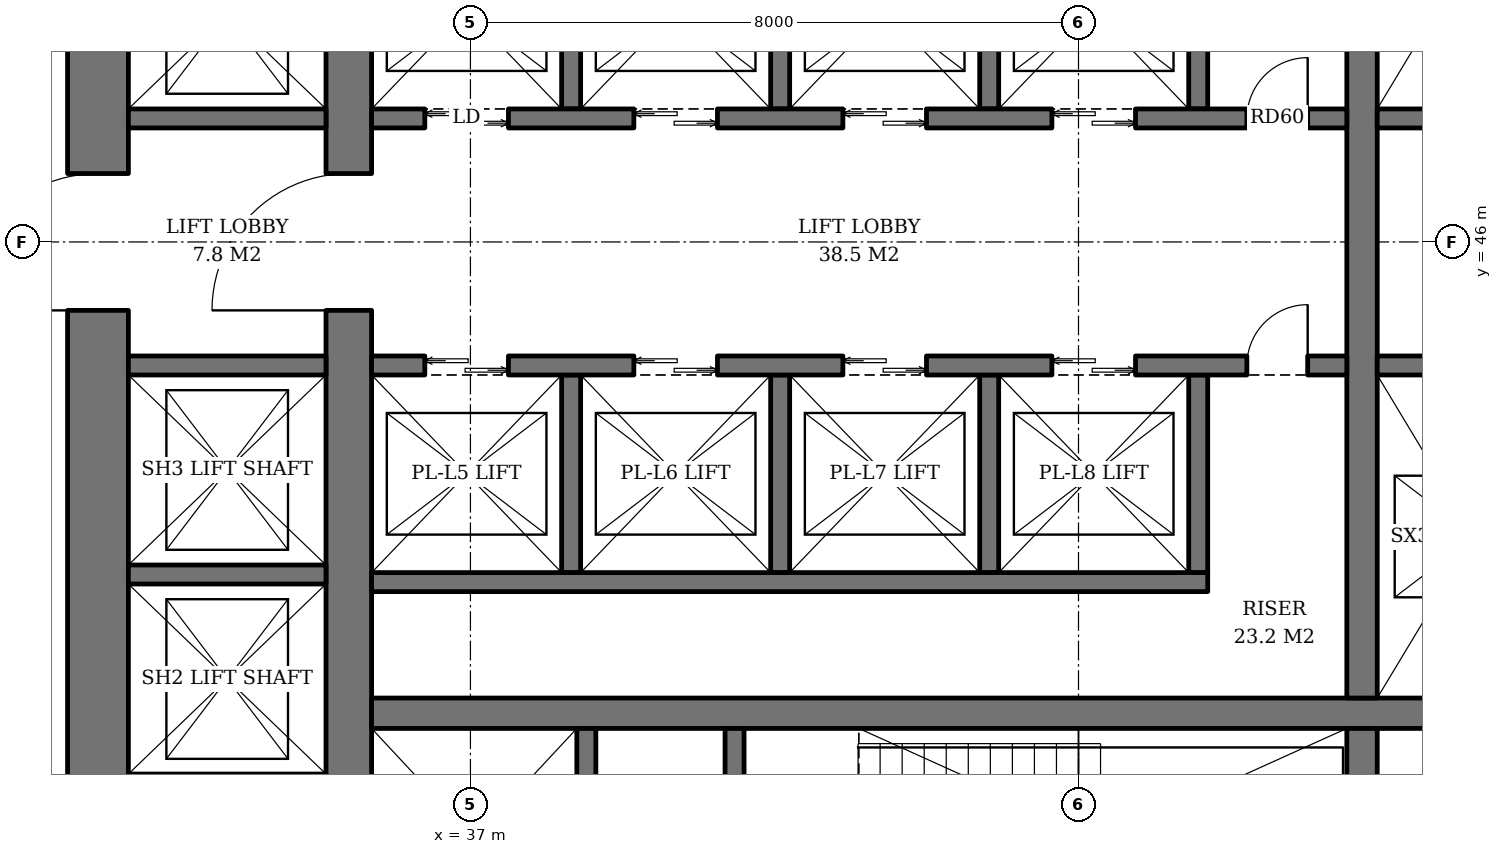
"""IFC4 building model, lengths in metres.
Left out: names, types, materials, properties, quantities, classifications, styles, units other than length and angle.
Written with IfcOpenShell. Run it as: python <this file> out.ifc"""

import sys

from ifc_helpers import new_model, si_unit, direction, frame, frame_2d, origin, place, context, subcontext, project, spatial, rectangle, extrude, element, fill, save


model = new_model("IFC4")
c1 = context("Model", 3, precision=1e-05, world=origin(), true_north=direction((0.0, 1.0)))
c2 = subcontext(c1, "Body", "Model", "MODEL_VIEW")
j1 = project(units=[si_unit("LENGTHUNIT", "METRE"), si_unit("PLANEANGLEUNIT", "RADIAN")], contexts=[c1])
p1 = place(None, origin())
s1 = spatial("IfcSite", under=j1, at=p1, CompositionType="ELEMENT")
p2 = place(p1, origin())
s2 = spatial("IfcBuilding", under=s1, at=p2, CompositionType="ELEMENT")
p3 = place(p2, frame((0.0, 0.0, 62.8)))
s3 = spatial("IfcBuildingStorey", under=s2, at=p3, CompositionType="ELEMENT", Elevation=62.8)
p4 = place(p3, frame((35.4, 36.7, 0.0), z_axis=(0.0, 0.0, 1.0), x_axis=(0.0, 1.0, 0.0)))
e1 = element("IfcWall", 1, at=p4, inside=s3, PredefinedType="SHEAR", context=c2, shape_type="SweptSolid", body=[
    extrude(rectangle(XDim=18.6, YDim=0.6, at=frame_2d((9.3, 0.0))), origin(), (0.0, 0.0, 1.0), 3.8),
])
p5 = place(p4, frame((8.4, 0.0, 0.0)))
e2 = element("IfcOpeningElement", 2, at=p5, cuts=e1, PredefinedType="OPENING", context=c2, shape_type="SweptSolid", body=[
    extrude(rectangle(XDim=1.8, YDim=2.4, at=frame_2d((0.9, 1.2))), frame((0.0, 0.31, 0.0), z_axis=(0.0, -1.0, 0.0), x_axis=(1.0, 0.0, 0.0)), (0.0, 0.0, 1.0), 0.62),
])
p6 = place(p3, frame((32.1, 33.5, 0.0), z_axis=(0.0, 0.0, 1.0), x_axis=(0.0, 1.0, 0.0)))
e3 = element("IfcWall", 3, at=p6, inside=s3, PredefinedType="SHEAR", context=c2, shape_type="SweptSolid", body=[
    extrude(rectangle(XDim=25.0, YDim=0.8, at=frame_2d((12.5, 0.0))), origin(), (0.0, 0.0, 1.0), 3.8),
])
p7 = place(p6, frame((11.6, 0.0, 0.0)))
e4 = element("IfcOpeningElement", 4, at=p7, cuts=e3, PredefinedType="OPENING", context=c2, shape_type="SweptSolid", body=[
    extrude(rectangle(XDim=1.8, YDim=2.4, at=frame_2d((0.9, 1.2))), frame((0.0, 0.41, 0.0), z_axis=(0.0, -1.0, 0.0), x_axis=(1.0, 0.0, 0.0)), (0.0, 0.0, 1.0), 0.82),
])
p8 = place(p3, frame((35.7, 39.8, 0.0), z_axis=(0.0, 0.0, 1.0), x_axis=(1.0, 0.0, 0.0)))
e5 = element("IfcWall", 5, at=p8, inside=s3, PredefinedType="SHEAR", context=c2, shape_type="SweptSolid", body=[
    extrude(rectangle(XDim=18.6, YDim=0.4, at=frame_2d((9.3, 0.0))), origin(), (0.0, 0.0, 1.0), 3.8),
])
p9 = place(p3, frame((48.73, 36.7, 0.0), z_axis=(0.0, 0.0, 1.0), x_axis=(0.0, 1.0, 0.0)))
e6 = element("IfcWall", 6, at=p9, inside=s3, PredefinedType="SHEAR", context=c2, shape_type="SweptSolid", body=[
    extrude(rectangle(XDim=2.9, YDim=0.4, at=frame_2d((1.45, 0.0))), origin(), (0.0, 0.0, 1.0), 3.8),
])
p10 = place(p3, frame((48.73, 40.0, 0.0), z_axis=(0.0, 0.0, 1.0), x_axis=(0.0, 1.0, 0.0)))
e7 = element("IfcWall", 7, at=p10, inside=s3, PredefinedType="SHEAR", context=c2, shape_type="SweptSolid", body=[
    extrude(rectangle(XDim=12.0, YDim=0.4, at=frame_2d((6.0, 0.0))), origin(), (0.0, 0.0, 1.0), 3.8),
])
p11 = place(p3, frame((38.525, 36.7, 0.0), z_axis=(0.0, 0.0, 1.0), x_axis=(0.0, 1.0, 0.0)))
e8 = element("IfcWall", 8, at=p11, inside=s3, PredefinedType="SHEAR", context=c2, shape_type="SweptSolid", body=[
    extrude(rectangle(XDim=2.9, YDim=0.25, at=frame_2d((1.45, 0.0))), origin(), (0.0, 0.0, 1.0), 3.8),
])
p12 = place(p11, frame((0.8, 0.0, 0.0)))
e9 = element("IfcOpeningElement", 9, at=p12, cuts=e8, PredefinedType="OPENING", context=c2, shape_type="SweptSolid", body=[
    extrude(rectangle(XDim=1.3, YDim=2.2, at=frame_2d((0.65, 1.1))), frame((0.0, 0.135, 0.0), z_axis=(0.0, -1.0, 0.0), x_axis=(1.0, 0.0, 0.0)), (0.0, 0.0, 1.0), 0.27),
])
p13 = place(p3, frame((40.475, 36.7, 0.0), z_axis=(0.0, 0.0, 1.0), x_axis=(0.0, 1.0, 0.0)))
e10 = element("IfcWall", 10, at=p13, inside=s3, PredefinedType="SHEAR", context=c2, shape_type="SweptSolid", body=[
    extrude(rectangle(XDim=2.9, YDim=0.25, at=frame_2d((1.45, 0.0))), origin(), (0.0, 0.0, 1.0), 3.8),
])
p14 = place(p13, frame((0.75, 0.0, 0.0)))
e11 = element("IfcOpeningElement", 11, at=p14, cuts=e10, PredefinedType="OPENING", context=c2, shape_type="SweptSolid", body=[
    extrude(rectangle(XDim=1.2, YDim=2.1, at=frame_2d((0.6, 1.05))), frame((0.0, 0.135, 0.0), z_axis=(0.0, -1.0, 0.0), x_axis=(1.0, 0.0, 0.0)), (0.0, 0.0, 1.0), 0.27),
])
for number, where, z_axis, x_axis in (
    (12, (38.325, 47.75, 0.0), (0.0, 0.0, 1.0), (0.0, 1.0, 0.0)),
    (13, (41.075, 47.75, 0.0), (0.0, 0.0, 1.0), (0.0, 1.0, 0.0)),
    (14, (43.825, 47.75, 0.0), (0.0, 0.0, 1.0), (0.0, 1.0, 0.0)),
    (15, (46.575, 47.75, 0.0), (0.0, 0.0, 1.0), (0.0, 1.0, 0.0)),
):
    element("IfcWall", number, at=place(p3, frame(where, z_axis=z_axis, x_axis=x_axis)), inside=s3, PredefinedType="SHEAR", context=c2, shape_type="SweptSolid", body=[
        extrude(rectangle(XDim=2.6, YDim=0.25, at=frame_2d((1.3, 0.0))), origin(), (0.0, 0.0, 1.0), 3.8),
    ])
p15 = place(p3, frame((35.7, 47.625, 0.0), z_axis=(0.0, 0.0, 1.0), x_axis=(1.0, 0.0, 0.0)))
e16 = element("IfcWall", 16, at=p15, inside=s3, PredefinedType="SHEAR", context=c2, shape_type="SweptSolid", body=[
    extrude(rectangle(XDim=12.83, YDim=0.25, at=frame_2d((6.415, 0.0))), origin(), (0.0, 0.0, 1.0), 3.8),
])
p16 = place(p15, frame((0.7, 0.0, 0.0)))
e17 = element("IfcOpeningElement", 17, at=p16, cuts=e16, PredefinedType="OPENING", context=c2, shape_type="SweptSolid", body=[
    extrude(rectangle(XDim=1.1, YDim=2.2, at=frame_2d((0.55, 1.1))), frame((0.0, 0.135, 0.0), z_axis=(0.0, -1.0, 0.0), x_axis=(1.0, 0.0, 0.0)), (0.0, 0.0, 1.0), 0.27),
])
p17 = place(p15, frame((3.45, 0.0, 0.0)))
e18 = element("IfcOpeningElement", 18, at=p17, cuts=e16, PredefinedType="OPENING", context=c2, shape_type="SweptSolid", body=[
    extrude(rectangle(XDim=1.1, YDim=2.2, at=frame_2d((0.55, 1.1))), frame((0.0, 0.135, 0.0), z_axis=(0.0, -1.0, 0.0), x_axis=(1.0, 0.0, 0.0)), (0.0, 0.0, 1.0), 0.27),
])
p18 = place(p15, frame((6.2, 0.0, 0.0)))
e19 = element("IfcOpeningElement", 19, at=p18, cuts=e16, PredefinedType="OPENING", context=c2, shape_type="SweptSolid", body=[
    extrude(rectangle(XDim=1.1, YDim=2.2, at=frame_2d((0.55, 1.1))), frame((0.0, 0.135, 0.0), z_axis=(0.0, -1.0, 0.0), x_axis=(1.0, 0.0, 0.0)), (0.0, 0.0, 1.0), 0.27),
])
p19 = place(p15, frame((8.95, 0.0, 0.0)))
e20 = element("IfcOpeningElement", 20, at=p19, cuts=e16, PredefinedType="OPENING", context=c2, shape_type="SweptSolid", body=[
    extrude(rectangle(XDim=1.1, YDim=2.2, at=frame_2d((0.55, 1.1))), frame((0.0, 0.135, 0.0), z_axis=(0.0, -1.0, 0.0), x_axis=(1.0, 0.0, 0.0)), (0.0, 0.0, 1.0), 0.27),
])
p20 = place(p15, frame((11.515, 0.0, 0.0)))
e21 = element("IfcOpeningElement", 21, at=p20, cuts=e16, PredefinedType="OPENING", context=c2, shape_type="SweptSolid", body=[
    extrude(rectangle(XDim=0.8, YDim=2.0, at=frame_2d((0.4, 1.0))), frame((0.0, 0.135, 0.0), z_axis=(0.0, -1.0, 0.0), x_axis=(1.0, 0.0, 0.0)), (0.0, 0.0, 1.0), 0.27),
])
for number, where, z_axis, x_axis in (
    (22, (38.325, 44.25, 0.0), (0.0, 0.0, 1.0), (0.0, -1.0, 0.0)),
    (23, (41.075, 44.25, 0.0), (0.0, 0.0, 1.0), (0.0, -1.0, 0.0)),
    (24, (43.825, 44.25, 0.0), (0.0, 0.0, 1.0), (0.0, -1.0, 0.0)),
    (25, (46.575, 44.25, 0.0), (0.0, 0.0, 1.0), (0.0, -1.0, 0.0)),
):
    element("IfcWall", number, at=place(p3, frame(where, z_axis=z_axis, x_axis=x_axis)), inside=s3, PredefinedType="SHEAR", context=c2, shape_type="SweptSolid", body=[
        extrude(rectangle(XDim=2.6, YDim=0.25, at=frame_2d((1.3, 0.0))), origin(), (0.0, 0.0, 1.0), 3.8),
    ])
p21 = place(p3, frame((35.7, 41.525, 0.0), z_axis=(0.0, 0.0, 1.0), x_axis=(1.0, 0.0, 0.0)))
e26 = element("IfcWall", 26, at=p21, inside=s3, PredefinedType="SHEAR", context=c2, shape_type="SweptSolid", body=[
    extrude(rectangle(XDim=11.0, YDim=0.25, at=frame_2d((5.5, 0.0))), origin(), (0.0, 0.0, 1.0), 3.8),
])
p22 = place(p3, frame((35.7, 44.375, 0.0), z_axis=(0.0, 0.0, 1.0), x_axis=(1.0, 0.0, 0.0)))
e27 = element("IfcWall", 27, at=p22, inside=s3, PredefinedType="SHEAR", context=c2, shape_type="SweptSolid", body=[
    extrude(rectangle(XDim=12.83, YDim=0.25, at=frame_2d((6.415, 0.0))), origin(), (0.0, 0.0, 1.0), 3.8),
])
p23 = place(p22, frame((0.7, 0.0, 0.0)))
e28 = element("IfcOpeningElement", 28, at=p23, cuts=e27, PredefinedType="OPENING", context=c2, shape_type="SweptSolid", body=[
    extrude(rectangle(XDim=1.1, YDim=2.2, at=frame_2d((0.55, 1.1))), frame((0.0, 0.135, 0.0), z_axis=(0.0, -1.0, 0.0), x_axis=(1.0, 0.0, 0.0)), (0.0, 0.0, 1.0), 0.27),
])
p24 = place(p22, frame((3.45, 0.0, 0.0)))
e29 = element("IfcOpeningElement", 29, at=p24, cuts=e27, PredefinedType="OPENING", context=c2, shape_type="SweptSolid", body=[
    extrude(rectangle(XDim=1.1, YDim=2.2, at=frame_2d((0.55, 1.1))), frame((0.0, 0.135, 0.0), z_axis=(0.0, -1.0, 0.0), x_axis=(1.0, 0.0, 0.0)), (0.0, 0.0, 1.0), 0.27),
])
p25 = place(p22, frame((6.2, 0.0, 0.0)))
e30 = element("IfcOpeningElement", 30, at=p25, cuts=e27, PredefinedType="OPENING", context=c2, shape_type="SweptSolid", body=[
    extrude(rectangle(XDim=1.1, YDim=2.2, at=frame_2d((0.55, 1.1))), frame((0.0, 0.135, 0.0), z_axis=(0.0, -1.0, 0.0), x_axis=(1.0, 0.0, 0.0)), (0.0, 0.0, 1.0), 0.27),
])
p26 = place(p22, frame((8.95, 0.0, 0.0)))
e31 = element("IfcOpeningElement", 31, at=p26, cuts=e27, PredefinedType="OPENING", context=c2, shape_type="SweptSolid", body=[
    extrude(rectangle(XDim=1.1, YDim=2.2, at=frame_2d((0.55, 1.1))), frame((0.0, 0.135, 0.0), z_axis=(0.0, -1.0, 0.0), x_axis=(1.0, 0.0, 0.0)), (0.0, 0.0, 1.0), 0.27),
])
p27 = place(p22, frame((11.515, 0.0, 0.0)))
e32 = element("IfcOpeningElement", 32, at=p27, cuts=e27, PredefinedType="OPENING", context=c2, shape_type="SweptSolid", body=[
    extrude(rectangle(XDim=0.8, YDim=2.0, at=frame_2d((0.4, 1.0))), frame((0.0, 0.135, 0.0), z_axis=(0.0, -1.0, 0.0), x_axis=(1.0, 0.0, 0.0)), (0.0, 0.0, 1.0), 0.27),
])
for number, where, z_axis, x_axis in (
    (33, (48.93, 47.625, 0.0), (0.0, 0.0, 1.0), (1.0, 0.0, 0.0)),
    (34, (48.93, 44.375, 0.0), (0.0, 0.0, 1.0), (1.0, 0.0, 0.0)),
):
    element("IfcWall", number, at=place(p3, frame(where, z_axis=z_axis, x_axis=x_axis)), inside=s3, PredefinedType="SHEAR", context=c2, shape_type="SweptSolid", body=[
        extrude(rectangle(XDim=5.37, YDim=0.25, at=frame_2d((2.685, 0.0))), origin(), (0.0, 0.0, 1.0), 3.8),
    ])
for number, where, z_axis, x_axis in (
    (35, (32.5, 41.625, 0.0), (0.0, 0.0, 1.0), (1.0, 0.0, 0.0)),
    (36, (32.5, 44.375, 0.0), (0.0, 0.0, 1.0), (1.0, 0.0, 0.0)),
    (37, (32.5, 47.625, 0.0), (0.0, 0.0, 1.0), (1.0, 0.0, 0.0)),
):
    element("IfcWall", number, at=place(p3, frame(where, z_axis=z_axis, x_axis=x_axis)), inside=s3, PredefinedType="SHEAR", context=c2, shape_type="SweptSolid", body=[
        extrude(rectangle(XDim=2.6, YDim=0.25, at=frame_2d((1.3, 0.0))), origin(), (0.0, 0.0, 1.0), 3.8),
    ])
p28 = place(p16, origin())
e38 = element("IfcDoor", 38, at=p28, inside=s3, OperationType="DOUBLE_DOOR_SLIDING", PredefinedType="DOOR", context=c2, shape_type="SweptSolid", body=[
    extrude(rectangle(XDim=1.1, YDim=2.2, at=frame_2d((0.55, 1.1))), frame((0.0, 0.025, 0.0), z_axis=(0.0, -1.0, 0.0), x_axis=(1.0, 0.0, 0.0)), (0.0, 0.0, 1.0), 0.05),
])
fill(e17, e38)
p29 = place(p17, origin())
e39 = element("IfcDoor", 39, at=p29, inside=s3, OperationType="DOUBLE_DOOR_SLIDING", PredefinedType="DOOR", context=c2, shape_type="SweptSolid", body=[
    extrude(rectangle(XDim=1.1, YDim=2.2, at=frame_2d((0.55, 1.1))), frame((0.0, 0.025, 0.0), z_axis=(0.0, -1.0, 0.0), x_axis=(1.0, 0.0, 0.0)), (0.0, 0.0, 1.0), 0.05),
])
fill(e18, e39)
p30 = place(p18, origin())
e40 = element("IfcDoor", 40, at=p30, inside=s3, OperationType="DOUBLE_DOOR_SLIDING", PredefinedType="DOOR", context=c2, shape_type="SweptSolid", body=[
    extrude(rectangle(XDim=1.1, YDim=2.2, at=frame_2d((0.55, 1.1))), frame((0.0, 0.025, 0.0), z_axis=(0.0, -1.0, 0.0), x_axis=(1.0, 0.0, 0.0)), (0.0, 0.0, 1.0), 0.05),
])
fill(e19, e40)
p31 = place(p19, origin())
e41 = element("IfcDoor", 41, at=p31, inside=s3, OperationType="DOUBLE_DOOR_SLIDING", PredefinedType="DOOR", context=c2, shape_type="SweptSolid", body=[
    extrude(rectangle(XDim=1.1, YDim=2.2, at=frame_2d((0.55, 1.1))), frame((0.0, 0.025, 0.0), z_axis=(0.0, -1.0, 0.0), x_axis=(1.0, 0.0, 0.0)), (0.0, 0.0, 1.0), 0.05),
])
fill(e20, e41)
p32 = place(p20, origin())
e42 = element("IfcDoor", 42, at=p32, inside=s3, OperationType="SINGLE_SWING_RIGHT", PredefinedType="DOOR", context=c2, shape_type="SweptSolid", body=[
    extrude(rectangle(XDim=0.8, YDim=2.0, at=frame_2d((0.4, 1.0))), frame((0.0, 0.025, 0.0), z_axis=(0.0, -1.0, 0.0), x_axis=(1.0, 0.0, 0.0)), (0.0, 0.0, 1.0), 0.05),
])
fill(e21, e42)
p33 = place(p23, origin())
e43 = element("IfcDoor", 43, at=p33, inside=s3, OperationType="DOUBLE_DOOR_SLIDING", PredefinedType="DOOR", context=c2, shape_type="SweptSolid", body=[
    extrude(rectangle(XDim=1.1, YDim=2.2, at=frame_2d((0.55, 1.1))), frame((0.0, 0.025, 0.0), z_axis=(0.0, -1.0, 0.0), x_axis=(1.0, 0.0, 0.0)), (0.0, 0.0, 1.0), 0.05),
])
fill(e28, e43)
p34 = place(p24, origin())
e44 = element("IfcDoor", 44, at=p34, inside=s3, OperationType="DOUBLE_DOOR_SLIDING", PredefinedType="DOOR", context=c2, shape_type="SweptSolid", body=[
    extrude(rectangle(XDim=1.1, YDim=2.2, at=frame_2d((0.55, 1.1))), frame((0.0, 0.025, 0.0), z_axis=(0.0, -1.0, 0.0), x_axis=(1.0, 0.0, 0.0)), (0.0, 0.0, 1.0), 0.05),
])
fill(e29, e44)
p35 = place(p25, origin())
e45 = element("IfcDoor", 45, at=p35, inside=s3, OperationType="DOUBLE_DOOR_SLIDING", PredefinedType="DOOR", context=c2, shape_type="SweptSolid", body=[
    extrude(rectangle(XDim=1.1, YDim=2.2, at=frame_2d((0.55, 1.1))), frame((0.0, 0.025, 0.0), z_axis=(0.0, -1.0, 0.0), x_axis=(1.0, 0.0, 0.0)), (0.0, 0.0, 1.0), 0.05),
])
fill(e30, e45)
p36 = place(p26, origin())
e46 = element("IfcDoor", 46, at=p36, inside=s3, OperationType="DOUBLE_DOOR_SLIDING", PredefinedType="DOOR", context=c2, shape_type="SweptSolid", body=[
    extrude(rectangle(XDim=1.1, YDim=2.2, at=frame_2d((0.55, 1.1))), frame((0.0, 0.025, 0.0), z_axis=(0.0, -1.0, 0.0), x_axis=(1.0, 0.0, 0.0)), (0.0, 0.0, 1.0), 0.05),
])
fill(e31, e46)
p37 = place(p27, origin())
e47 = element("IfcDoor", 47, at=p37, inside=s3, OperationType="SINGLE_SWING_RIGHT", PredefinedType="DOOR", context=c2, shape_type="SweptSolid", body=[
    extrude(rectangle(XDim=0.8, YDim=2.0, at=frame_2d((0.4, 1.0))), frame((0.0, 0.025, 0.0), z_axis=(0.0, -1.0, 0.0), x_axis=(1.0, 0.0, 0.0)), (0.0, 0.0, 1.0), 0.05),
])
fill(e32, e47)
p38 = place(p5, origin())
e48 = element("IfcDoor", 48, at=p38, inside=s3, OperationType="DOUBLE_DOOR_SINGLE_SWING", PredefinedType="DOOR", context=c2, shape_type="SweptSolid", body=[
    extrude(rectangle(XDim=1.8, YDim=2.4, at=frame_2d((0.9, 1.2))), frame((0.0, 0.025, 0.0), z_axis=(0.0, -1.0, 0.0), x_axis=(1.0, 0.0, 0.0)), (0.0, 0.0, 1.0), 0.05),
])
fill(e2, e48)
p39 = place(p7, origin())
e49 = element("IfcDoor", 49, at=p39, inside=s3, OperationType="DOUBLE_DOOR_SINGLE_SWING", PredefinedType="DOOR", context=c2, shape_type="SweptSolid", body=[
    extrude(rectangle(XDim=1.8, YDim=2.4, at=frame_2d((0.9, 1.2))), frame((0.0, 0.025, 0.0), z_axis=(0.0, -1.0, 0.0), x_axis=(1.0, 0.0, 0.0)), (0.0, 0.0, 1.0), 0.05),
])
fill(e4, e49)
save(model, sys.argv[1])
